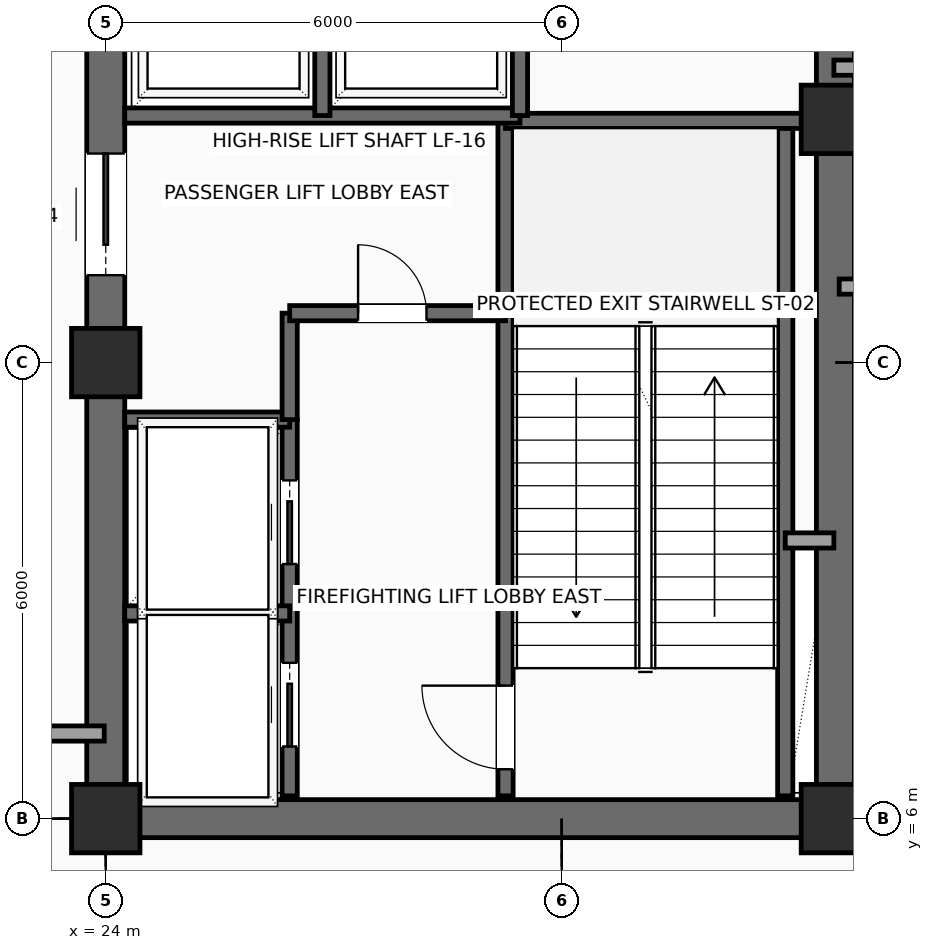
"""IFC4 building model, lengths in metres.
Left out: names, types, materials, properties, quantities, classifications, styles, units other than length and angle.
Written with IfcOpenShell. Run it as: python <this file> out.ifc"""

import sys

from ifc_helpers import new_model, si_unit, direction, frame, frame_2d, origin, origin_2d, place, context, subcontext, project, spatial, rectangle, extrude, element, fill, save


model = new_model("IFC4")
c1 = context("Model", 3, precision=1e-05, world=origin(), true_north=direction((0.0, 1.0)))
c2 = subcontext(c1, "Body", "Model", "MODEL_VIEW")
j1 = project(units=[si_unit("LENGTHUNIT", "METRE"), si_unit("PLANEANGLEUNIT", "RADIAN")], contexts=[c1])
p1 = place(None, origin())
s1 = spatial("IfcSite", under=j1, at=p1, CompositionType="ELEMENT")
p2 = place(p1, origin())
s2 = spatial("IfcBuilding", under=s1, at=p2, CompositionType="ELEMENT")
p3 = place(p2, frame((0.0, 0.0, 234.9)))
s3 = spatial("IfcBuildingStorey", under=s2, at=p3, CompositionType="ELEMENT", Elevation=234.9)
for number, where, z_axis, x_axis in (
    (1, (24.0, 6.0, 0.0), (0.0, 0.0, 1.0), (1.0, 0.0, 0.0)),
    (2, (24.0, 12.0, 0.0), (0.0, 0.0, 1.0), (1.0, 0.0, 0.0)),
    (3, (33.6, 6.0, 0.0), (0.0, 0.0, 1.0), (1.0, 0.0, 0.0)),
    (4, (33.6, 15.2, 0.0), (0.0, 0.0, 1.0), (1.0, 0.0, 0.0)),
):
    element("IfcColumn", number, at=place(p3, frame(where, z_axis=z_axis, x_axis=x_axis)), inside=s3, PredefinedType="COLUMN", context=c2, shape_type="SweptSolid", body=[
        extrude(rectangle(XDim=0.9, YDim=0.9, at=origin_2d()), origin(), (0.0, 0.0, 1.0), 4.8),
    ])
p4 = place(p3, frame((24.0, 6.0, 0.0), z_axis=(0.0, 0.0, 1.0), x_axis=(1.0, 0.0, 0.0)))
e5 = element("IfcWall", 5, at=p4, inside=s3, PredefinedType="SHEAR", context=c2, shape_type="SweptSolid", body=[
    extrude(rectangle(XDim=9.6, YDim=0.5, at=frame_2d((4.8, 0.0))), origin(), (0.0, 0.0, 1.0), 4.6),
])
p5 = place(p3, frame((24.0, 6.0, 0.0), z_axis=(0.0, 0.0, 1.0), x_axis=(0.0, 1.0, 0.0)))
e6 = element("IfcWall", 6, at=p5, inside=s3, PredefinedType="SHEAR", context=c2, shape_type="SweptSolid", body=[
    extrude(rectangle(XDim=12.0, YDim=0.5, at=frame_2d((6.0, 0.0))), origin(), (0.0, 0.0, 1.0), 4.6),
])
p6 = place(p5, frame((7.15, 0.0, 0.0)))
e7 = element("IfcOpeningElement", 7, at=p6, cuts=e6, PredefinedType="OPENING", context=c2, shape_type="SweptSolid", body=[
    extrude(rectangle(XDim=1.6, YDim=2.3, at=frame_2d((0.8, 1.15))), frame((0.0, 0.26, 0.0), z_axis=(0.0, -1.0, 0.0), x_axis=(1.0, 0.0, 0.0)), (0.0, 0.0, 1.0), 0.52),
])
p7 = place(p3, frame((33.6, 6.0, 0.0), z_axis=(0.0, 0.0, 1.0), x_axis=(0.0, 1.0, 0.0)))
e8 = element("IfcWall", 8, at=p7, inside=s3, PredefinedType="SHEAR", context=c2, shape_type="SweptSolid", body=[
    extrude(rectangle(XDim=12.0, YDim=0.5, at=frame_2d((6.0, 0.0))), origin(), (0.0, 0.0, 1.0), 4.6),
])
p8 = place(p7, frame((10.3, 0.0, 0.0)))
e9 = element("IfcOpeningElement", 9, at=p8, cuts=e8, PredefinedType="OPENING", context=c2, shape_type="SweptSolid", body=[
    extrude(rectangle(XDim=0.9, YDim=2.15, at=frame_2d((0.45, 1.075))), frame((0.0, 0.26, 0.0), z_axis=(0.0, -1.0, 0.0), x_axis=(1.0, 0.0, 0.0)), (0.0, 0.0, 1.0), 0.52),
])
p9 = place(p3, frame((29.26, 6.3, 0.0), z_axis=(0.0, 0.0, 1.0), x_axis=(0.0, 1.0, 0.0)))
e10 = element("IfcWall", 10, at=p9, inside=s3, PredefinedType="SHEAR", context=c2, shape_type="SweptSolid", body=[
    extrude(rectangle(XDim=8.88, YDim=0.2, at=frame_2d((4.44, 0.0))), origin(), (0.0, 0.0, 1.0), 4.6),
])
p10 = place(p9, frame((0.35, 0.0, 0.0)))
e11 = element("IfcOpeningElement", 11, at=p10, cuts=e10, PredefinedType="OPENING", context=c2, shape_type="SweptSolid", body=[
    extrude(rectangle(XDim=1.1, YDim=2.2, at=frame_2d((0.55, 1.1))), frame((0.0, 0.11, 0.0), z_axis=(0.0, -1.0, 0.0), x_axis=(1.0, 0.0, 0.0)), (0.0, 0.0, 1.0), 0.22),
])
p11 = place(p3, frame((32.94, 6.3, 0.0), z_axis=(0.0, 0.0, 1.0), x_axis=(0.0, 1.0, 0.0)))
e12 = element("IfcWall", 12, at=p11, inside=s3, PredefinedType="SHEAR", context=c2, shape_type="SweptSolid", body=[
    extrude(rectangle(XDim=8.88, YDim=0.2, at=frame_2d((4.44, 0.0))), origin(), (0.0, 0.0, 1.0), 4.6),
])
p12 = place(p3, frame((29.26, 15.18, 0.0), z_axis=(0.0, 0.0, 1.0), x_axis=(1.0, 0.0, 0.0)))
e13 = element("IfcWall", 13, at=p12, inside=s3, PredefinedType="SHEAR", context=c2, shape_type="SweptSolid", body=[
    extrude(rectangle(XDim=4.04, YDim=0.2, at=frame_2d((2.02, 0.0))), origin(), (0.0, 0.0, 1.0), 4.6),
])
p13 = place(p3, frame((26.42, 6.3, 0.0), z_axis=(0.0, 0.0, 1.0), x_axis=(0.0, 1.0, 0.0)))
e14 = element("IfcWall", 14, at=p13, inside=s3, PredefinedType="SHEAR", context=c2, shape_type="SweptSolid", body=[
    extrude(rectangle(XDim=4.95, YDim=0.2, at=frame_2d((2.475, 0.0))), origin(), (0.0, 0.0, 1.0), 4.6),
])
p14 = place(p13, frame((0.65, 0.0, 0.0)))
e15 = element("IfcOpeningElement", 15, at=p14, cuts=e14, PredefinedType="OPENING", context=c2, shape_type="SweptSolid", body=[
    extrude(rectangle(XDim=1.1, YDim=2.2, at=frame_2d((0.55, 1.1))), frame((0.0, 0.11, 0.0), z_axis=(0.0, -1.0, 0.0), x_axis=(1.0, 0.0, 0.0)), (0.0, 0.0, 1.0), 0.22),
])
p15 = place(p13, frame((3.05, 0.0, 0.0)))
e16 = element("IfcOpeningElement", 16, at=p15, cuts=e14, PredefinedType="OPENING", context=c2, shape_type="SweptSolid", body=[
    extrude(rectangle(XDim=1.1, YDim=2.2, at=frame_2d((0.55, 1.1))), frame((0.0, 0.11, 0.0), z_axis=(0.0, -1.0, 0.0), x_axis=(1.0, 0.0, 0.0)), (0.0, 0.0, 1.0), 0.22),
])
for number, where, z_axis, x_axis in (
    (17, (24.25, 8.7, 0.0), (0.0, 0.0, 1.0), (1.0, 0.0, 0.0)),
    (18, (24.25, 11.25, 0.0), (0.0, 0.0, 1.0), (1.0, 0.0, 0.0)),
):
    element("IfcWall", number, at=place(p3, frame(where, z_axis=z_axis, x_axis=x_axis)), inside=s3, PredefinedType="SHEAR", context=c2, shape_type="SweptSolid", body=[
        extrude(rectangle(XDim=2.17, YDim=0.2, at=frame_2d((1.085, 0.0))), origin(), (0.0, 0.0, 1.0), 4.6),
    ])
p16 = place(p3, frame((26.42, 11.25, 0.0), z_axis=(0.0, 0.0, 1.0), x_axis=(0.0, 1.0, 0.0)))
e19 = element("IfcWall", 19, at=p16, inside=s3, PredefinedType="SHEAR", context=c2, shape_type="SweptSolid", body=[
    extrude(rectangle(XDim=1.4, YDim=0.2, at=frame_2d((0.7, 0.0))), origin(), (0.0, 0.0, 1.0), 4.6),
])
p17 = place(p3, frame((26.42, 12.65, 0.0), z_axis=(0.0, 0.0, 1.0), x_axis=(1.0, 0.0, 0.0)))
e20 = element("IfcWall", 20, at=p17, inside=s3, PredefinedType="SHEAR", context=c2, shape_type="SweptSolid", body=[
    extrude(rectangle(XDim=2.84, YDim=0.2, at=frame_2d((1.42, 0.0))), origin(), (0.0, 0.0, 1.0), 4.6),
])
p18 = place(p17, frame((0.9, 0.0, 0.0)))
e21 = element("IfcOpeningElement", 21, at=p18, cuts=e20, PredefinedType="OPENING", context=c2, shape_type="SweptSolid", body=[
    extrude(rectangle(XDim=0.9, YDim=2.15, at=frame_2d((0.45, 1.075))), frame((0.0, 0.11, 0.0), z_axis=(0.0, -1.0, 0.0), x_axis=(1.0, 0.0, 0.0)), (0.0, 0.0, 1.0), 0.22),
])
p19 = place(p3, frame((32.94, 9.66, 0.0), z_axis=(0.0, 0.0, 1.0), x_axis=(1.0, 0.0, 0.0)))
e22 = element("IfcWall", 22, at=p19, inside=s3, PredefinedType="SOLIDWALL", context=c2, shape_type="SweptSolid", body=[
    extrude(rectangle(XDim=0.64, YDim=0.2, at=frame_2d((0.32, 0.0))), origin(), (0.0, 0.0, 1.0), 4.6),
])
p20 = place(p3, frame((24.25, 15.25, 0.0), z_axis=(0.0, 0.0, 1.0), x_axis=(1.0, 0.0, 0.0)))
e23 = element("IfcWall", 23, at=p20, inside=s3, PredefinedType="SHEAR", context=c2, shape_type="SweptSolid", body=[
    extrude(rectangle(XDim=5.2, YDim=0.2, at=frame_2d((2.6, 0.0))), origin(), (0.0, 0.0, 1.0), 4.6),
])
p21 = place(p3, frame((26.85, 15.25, 0.0), z_axis=(0.0, 0.0, 1.0), x_axis=(0.0, 1.0, 0.0)))
e24 = element("IfcWall", 24, at=p21, inside=s3, PredefinedType="SHEAR", context=c2, shape_type="SweptSolid", body=[
    extrude(rectangle(XDim=2.4, YDim=0.2, at=frame_2d((1.2, 0.0))), origin(), (0.0, 0.0, 1.0), 4.6),
])
p22 = place(p3, frame((29.45, 15.25, 0.0), z_axis=(0.0, 0.0, 1.0), x_axis=(0.0, 1.0, 0.0)))
e25 = element("IfcWall", 25, at=p22, inside=s3, PredefinedType="SHEAR", context=c2, shape_type="SweptSolid", body=[
    extrude(rectangle(XDim=2.45, YDim=0.2, at=frame_2d((1.225, 0.0))), origin(), (0.0, 0.0, 1.0), 4.6),
])
p23 = place(p3, frame((36.25, 15.88, 0.0), z_axis=(0.0, 0.0, 1.0), x_axis=(-1.0, 0.0, 0.0)))
e26 = element("IfcWall", 26, at=p23, inside=s3, PredefinedType="SOLIDWALL", context=c2, shape_type="SweptSolid", body=[
    extrude(rectangle(XDim=2.67, YDim=0.2, at=frame_2d((1.335, 0.0))), origin(), (0.0, 0.0, 1.0), 4.6),
])
p24 = place(p3, frame((23.98, 7.12, 0.0), z_axis=(0.0, 0.0, 1.0), x_axis=(-1.0, 0.0, 0.0)))
e27 = element("IfcWall", 27, at=p24, inside=s3, PredefinedType="SOLIDWALL", context=c2, shape_type="SweptSolid", body=[
    extrude(rectangle(XDim=3.23, YDim=0.2, at=frame_2d((1.615, 0.0))), origin(), (0.0, 0.0, 1.0), 4.6),
])
p25 = place(p3, frame((33.65, 13.0, 0.0), z_axis=(0.0, 0.0, 1.0), x_axis=(1.0, 0.0, 0.0)))
e28 = element("IfcWall", 28, at=p25, inside=s3, PredefinedType="SOLIDWALL", context=c2, shape_type="SweptSolid", body=[
    extrude(rectangle(XDim=4.9, YDim=0.2, at=frame_2d((2.45, 0.0))), origin(), (0.0, 0.0, 1.0), 4.6),
])
p26 = place(p6, origin())
e29 = element("IfcDoor", 29, at=p26, inside=s3, OperationType="DOUBLE_DOOR_SLIDING", PredefinedType="DOOR", context=c2, shape_type="SweptSolid", body=[
    extrude(rectangle(XDim=1.6, YDim=2.3, at=frame_2d((0.8, 1.15))), frame((0.0, 0.025, 0.0), z_axis=(0.0, -1.0, 0.0), x_axis=(1.0, 0.0, 0.0)), (0.0, 0.0, 1.0), 0.05),
])
fill(e7, e29)
p27 = place(p10, origin())
e30 = element("IfcDoor", 30, at=p27, inside=s3, OperationType="SINGLE_SWING_RIGHT", PredefinedType="DOOR", context=c2, shape_type="SweptSolid", body=[
    extrude(rectangle(XDim=1.1, YDim=2.2, at=frame_2d((0.55, 1.1))), frame((0.0, 0.025, 0.0), z_axis=(0.0, -1.0, 0.0), x_axis=(1.0, 0.0, 0.0)), (0.0, 0.0, 1.0), 0.05),
])
fill(e11, e30)
p28 = place(p14, origin())
e31 = element("IfcDoor", 31, at=p28, inside=s3, OperationType="SLIDING_TO_LEFT", PredefinedType="DOOR", context=c2, shape_type="SweptSolid", body=[
    extrude(rectangle(XDim=1.1, YDim=2.2, at=frame_2d((0.55, 1.1))), frame((0.0, 0.025, 0.0), z_axis=(0.0, -1.0, 0.0), x_axis=(1.0, 0.0, 0.0)), (0.0, 0.0, 1.0), 0.05),
])
fill(e15, e31)
p29 = place(p15, origin())
e32 = element("IfcDoor", 32, at=p29, inside=s3, OperationType="SLIDING_TO_LEFT", PredefinedType="DOOR", context=c2, shape_type="SweptSolid", body=[
    extrude(rectangle(XDim=1.1, YDim=2.2, at=frame_2d((0.55, 1.1))), frame((0.0, 0.025, 0.0), z_axis=(0.0, -1.0, 0.0), x_axis=(1.0, 0.0, 0.0)), (0.0, 0.0, 1.0), 0.05),
])
fill(e16, e32)
p30 = place(p18, origin())
e33 = element("IfcDoor", 33, at=p30, inside=s3, OperationType="SINGLE_SWING_LEFT", PredefinedType="DOOR", context=c2, shape_type="SweptSolid", body=[
    extrude(rectangle(XDim=0.9, YDim=2.15, at=frame_2d((0.45, 1.075))), frame((0.0, 0.025, 0.0), z_axis=(0.0, -1.0, 0.0), x_axis=(1.0, 0.0, 0.0)), (0.0, 0.0, 1.0), 0.05),
])
fill(e21, e33)
save(model, sys.argv[1])
